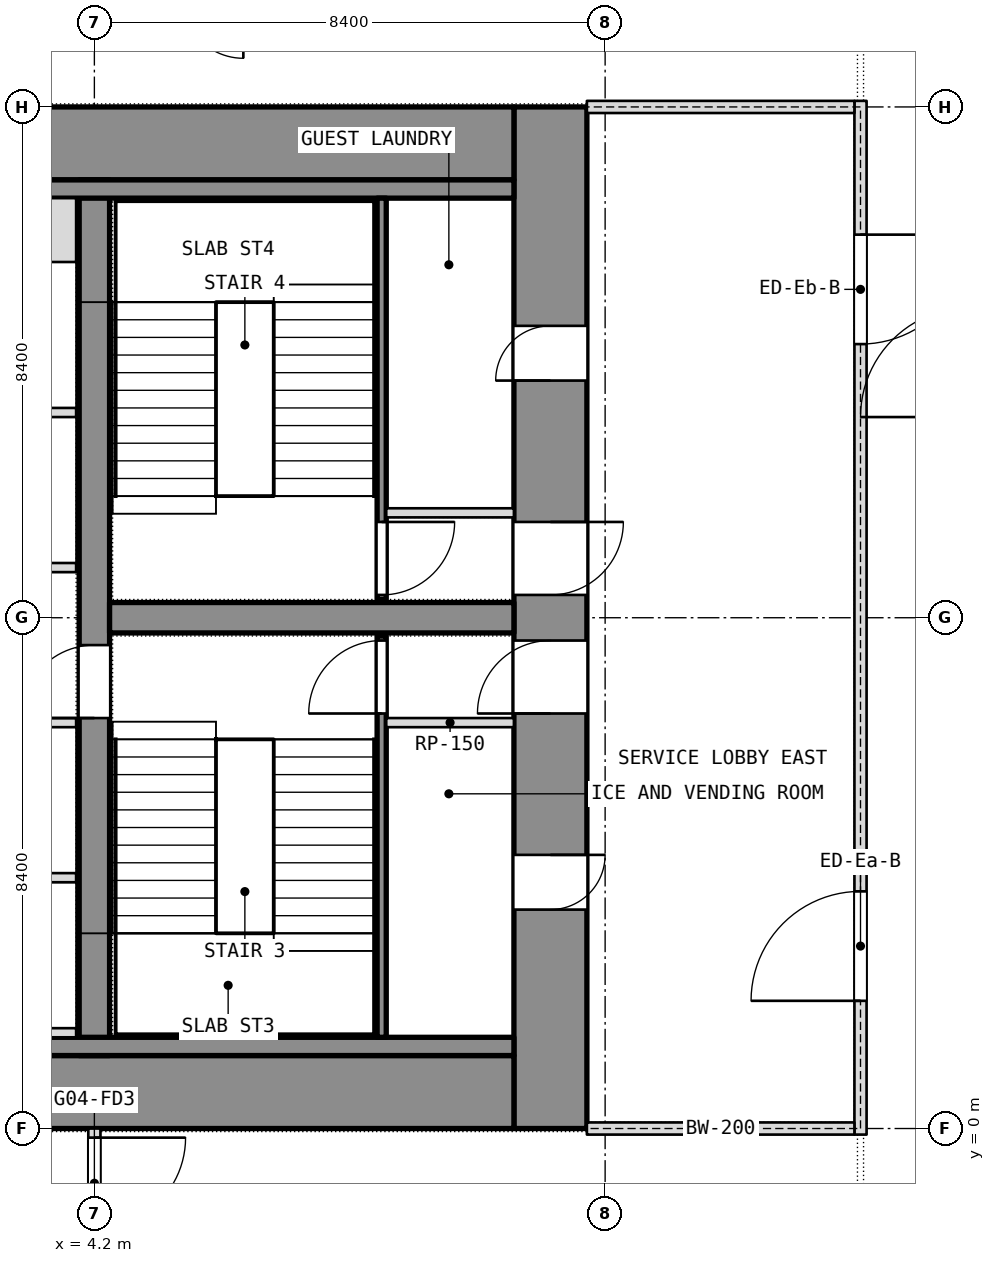
"""IFC4 building model, lengths in metres.
Left out: names, types, materials, properties, quantities, classifications, styles, units other than length and angle.
Written with IfcOpenShell. Run it as: python <this file> out.ifc"""

import sys

from ifc_helpers import new_model, si_unit, direction, frame, frame_2d, origin, place, context, subcontext, project, spatial, rectangle, extrude, element, fill, save


model = new_model("IFC4")
c1 = context("Model", 3, precision=1e-05, world=origin(), true_north=direction((0.0, 1.0)))
c2 = subcontext(c1, "Body", "Model", "MODEL_VIEW")
j1 = project(units=[si_unit("LENGTHUNIT", "METRE"), si_unit("PLANEANGLEUNIT", "RADIAN")], contexts=[c1])
p1 = place(None, origin())
s1 = spatial("IfcSite", under=j1, at=p1, CompositionType="ELEMENT")
p2 = place(p1, origin())
s2 = spatial("IfcBuilding", under=s1, at=p2, CompositionType="ELEMENT")
p3 = place(p2, frame((0.0, 0.0, 54.5)))
s3 = spatial("IfcBuildingStorey", under=s2, at=p3, CompositionType="ELEMENT", Elevation=54.5)
p4 = place(p3, frame((11.7, 0.0, 0.0), z_axis=(0.0, 0.0, 1.0), x_axis=(0.0, 1.0, 0.0)))
e1 = element("IfcWall", 1, at=p4, inside=s3, PredefinedType="SHEAR", context=c2, shape_type="SweptSolid", body=[
    extrude(rectangle(XDim=16.8, YDim=1.2, at=frame_2d((8.4, 0.0))), origin(), (0.0, 0.0, 1.0), 3.6),
])
p5 = place(p4, frame((3.6, 0.0, 0.0)))
e2 = element("IfcOpeningElement", 2, at=p5, cuts=e1, PredefinedType="OPENING", context=c2, shape_type="SweptSolid", body=[
    extrude(rectangle(XDim=0.9, YDim=2.1, at=frame_2d((0.45, 1.05))), frame((0.0, 0.6, 0.0), z_axis=(0.0, -1.0, 0.0), x_axis=(1.0, 0.0, 0.0)), (0.0, 0.0, 1.0), 1.2),
])
p6 = place(p4, frame((6.825, 0.0, 0.0)))
e3 = element("IfcOpeningElement", 3, at=p6, cuts=e1, PredefinedType="OPENING", context=c2, shape_type="SweptSolid", body=[
    extrude(rectangle(XDim=1.2, YDim=2.1, at=frame_2d((0.6, 1.05))), frame((0.0, 0.6, 0.0), z_axis=(0.0, -1.0, 0.0), x_axis=(1.0, 0.0, 0.0)), (0.0, 0.0, 1.0), 1.2),
])
p7 = place(p4, frame((12.3, 0.0, 0.0)))
e4 = element("IfcOpeningElement", 4, at=p7, cuts=e1, PredefinedType="OPENING", context=c2, shape_type="SweptSolid", body=[
    extrude(rectangle(XDim=0.9, YDim=2.1, at=frame_2d((0.45, 1.05))), frame((0.0, 0.6, 0.0), z_axis=(0.0, -1.0, 0.0), x_axis=(1.0, 0.0, 0.0)), (0.0, 0.0, 1.0), 1.2),
])
p8 = place(p4, frame((8.775, 0.0, 0.0)))
e5 = element("IfcOpeningElement", 5, at=p8, cuts=e1, PredefinedType="OPENING", context=c2, shape_type="SweptSolid", body=[
    extrude(rectangle(XDim=1.2, YDim=2.1, at=frame_2d((0.6, 1.05))), frame((0.0, 0.6, 0.0), z_axis=(0.0, -1.0, 0.0), x_axis=(1.0, 0.0, 0.0)), (0.0, 0.0, 1.0), 1.2),
])
for number, where, z_axis, x_axis in (
    (6, (-11.1, 0.6, 0.0), (0.0, 0.0, 1.0), (1.0, 0.0, 0.0)),
    (7, (-11.1, 16.2, 0.0), (0.0, 0.0, 1.0), (1.0, 0.0, 0.0)),
):
    element("IfcWall", number, at=place(p3, frame(where, z_axis=z_axis, x_axis=x_axis)), inside=s3, PredefinedType="SHEAR", context=c2, shape_type="SweptSolid", body=[
        extrude(rectangle(XDim=22.2, YDim=1.2, at=frame_2d((11.1, 0.0))), origin(), (0.0, 0.0, 1.0), 3.6),
    ])
p9 = place(p3, frame((4.2, 1.2, 0.0), z_axis=(0.0, 0.0, 1.0), x_axis=(0.0, 1.0, 0.0)))
e8 = element("IfcWall", 8, at=p9, inside=s3, PredefinedType="SHEAR", context=c2, shape_type="SweptSolid", body=[
    extrude(rectangle(XDim=14.4, YDim=0.5, at=frame_2d((7.2, 0.0))), origin(), (0.0, 0.0, 1.0), 3.6),
])
p10 = place(p9, frame((5.55, 0.0, 0.0)))
e9 = element("IfcOpeningElement", 9, at=p10, cuts=e8, PredefinedType="OPENING", context=c2, shape_type="SweptSolid", body=[
    extrude(rectangle(XDim=1.2, YDim=2.1, at=frame_2d((0.6, 1.05))), frame((0.0, 0.25, 0.0), z_axis=(0.0, -1.0, 0.0), x_axis=(1.0, 0.0, 0.0)), (0.0, 0.0, 1.0), 0.5),
])
p11 = place(p3, frame((4.45, 8.4, 0.0), z_axis=(0.0, 0.0, 1.0), x_axis=(1.0, 0.0, 0.0)))
e10 = element("IfcWall", 10, at=p11, inside=s3, PredefinedType="SHEAR", context=c2, shape_type="SweptSolid", body=[
    extrude(rectangle(XDim=6.65, YDim=0.5, at=frame_2d((3.325, 0.0))), origin(), (0.0, 0.0, 1.0), 3.6),
])
p12 = place(p3, frame((4.2, -12.7, 0.0), z_axis=(0.0, 0.0, 1.0), x_axis=(0.0, 1.0, 0.0)))
e11 = element("IfcWall", 11, at=p12, inside=s3, PredefinedType="PARTITIONING", context=c2, shape_type="SweptSolid", body=[
    extrude(rectangle(XDim=12.7, YDim=0.2, at=frame_2d((6.35, 0.0))), origin(), (0.0, 0.0, 1.0), 3.34),
])
p13 = place(p12, frame((11.05, 0.0, 0.0)))
e12 = element("IfcOpeningElement", 12, at=p13, cuts=e11, PredefinedType="OPENING", context=c2, shape_type="SweptSolid", body=[
    extrude(rectangle(XDim=1.5, YDim=2.1, at=frame_2d((0.75, 1.05))), frame((0.0, 0.1, 0.0), z_axis=(0.0, -1.0, 0.0), x_axis=(1.0, 0.0, 0.0)), (0.0, 0.0, 1.0), 0.2),
])
p14 = place(p12, frame((0.25, 0.0, 0.0)))
e13 = element("IfcOpeningElement", 13, at=p14, cuts=e11, PredefinedType="OPENING", context=c2, shape_type="SweptSolid", body=[
    extrude(rectangle(XDim=1.5, YDim=2.1, at=frame_2d((0.75, 1.05))), frame((0.0, 0.1, 0.0), z_axis=(0.0, -1.0, 0.0), x_axis=(1.0, 0.0, 0.0)), (0.0, 0.0, 1.0), 0.2),
])
for number, where, z_axis, x_axis in (
    (14, (-11.1, 1.35, 0.0), (0.0, 0.0, 1.0), (1.0, 0.0, 0.0)),
    (15, (-11.1, 15.45, 0.0), (0.0, 0.0, 1.0), (1.0, 0.0, 0.0)),
):
    element("IfcWall", number, at=place(p3, frame(where, z_axis=z_axis, x_axis=x_axis)), inside=s3, PredefinedType="PARTITIONING", context=c2, shape_type="SweptSolid", body=[
        extrude(rectangle(XDim=22.2, YDim=0.3, at=frame_2d((11.1, 0.0))), origin(), (0.0, 0.0, 1.0), 3.34),
    ])
p15 = place(p3, frame((8.925, 1.5, 0.0), z_axis=(0.0, 0.0, 1.0), x_axis=(0.0, 1.0, 0.0)))
e16 = element("IfcWall", 16, at=p15, inside=s3, PredefinedType="SHEAR", context=c2, shape_type="SweptSolid", body=[
    extrude(rectangle(XDim=6.6, YDim=0.15, at=frame_2d((3.3, 0.0))), origin(), (0.0, 0.0, 1.0), 3.34),
])
p16 = place(p15, frame((5.325, 0.0, 0.0)))
e17 = element("IfcOpeningElement", 17, at=p16, cuts=e16, PredefinedType="OPENING", context=c2, shape_type="SweptSolid", body=[
    extrude(rectangle(XDim=1.2, YDim=2.1, at=frame_2d((0.6, 1.05))), frame((0.0, 0.075, 0.0), z_axis=(0.0, -1.0, 0.0), x_axis=(1.0, 0.0, 0.0)), (0.0, 0.0, 1.0), 0.15),
])
p17 = place(p3, frame((9.0, 6.675, 0.0), z_axis=(0.0, 0.0, 1.0), x_axis=(1.0, 0.0, 0.0)))
e18 = element("IfcWall", 18, at=p17, inside=s3, PredefinedType="PARTITIONING", context=c2, shape_type="SweptSolid", body=[
    extrude(rectangle(XDim=2.1, YDim=0.15, at=frame_2d((1.05, 0.0))), origin(), (0.0, 0.0, 1.0), 3.34),
])
p18 = place(p3, frame((8.925, 8.7, 0.0), z_axis=(0.0, 0.0, 1.0), x_axis=(0.0, 1.0, 0.0)))
e19 = element("IfcWall", 19, at=p18, inside=s3, PredefinedType="SHEAR", context=c2, shape_type="SweptSolid", body=[
    extrude(rectangle(XDim=6.6, YDim=0.15, at=frame_2d((3.3, 0.0))), origin(), (0.0, 0.0, 1.0), 3.34),
])
p19 = place(p18, frame((0.075, 0.0, 0.0)))
e20 = element("IfcOpeningElement", 20, at=p19, cuts=e19, PredefinedType="OPENING", context=c2, shape_type="SweptSolid", body=[
    extrude(rectangle(XDim=1.2, YDim=2.1, at=frame_2d((0.6, 1.05))), frame((0.0, 0.075, 0.0), z_axis=(0.0, -1.0, 0.0), x_axis=(1.0, 0.0, 0.0)), (0.0, 0.0, 1.0), 0.15),
])
p20 = place(p3, frame((9.0, 10.125, 0.0), z_axis=(0.0, 0.0, 1.0), x_axis=(1.0, 0.0, 0.0)))
e21 = element("IfcWall", 21, at=p20, inside=s3, PredefinedType="PARTITIONING", context=c2, shape_type="SweptSolid", body=[
    extrude(rectangle(XDim=2.1, YDim=0.15, at=frame_2d((1.05, 0.0))), origin(), (0.0, 0.0, 1.0), 3.34),
])
p21 = place(p3, frame((-3.9, 4.125, 0.0), z_axis=(0.0, 0.0, 1.0), x_axis=(1.0, 0.0, 0.0)))
e22 = element("IfcWall", 22, at=p21, inside=s3, PredefinedType="PARTITIONING", context=c2, shape_type="SweptSolid", body=[
    extrude(rectangle(XDim=7.8, YDim=0.15, at=frame_2d((3.9, 0.0))), origin(), (0.0, 0.0, 1.0), 3.34),
])
p22 = place(p21, frame((3.75, 0.0, 0.0)))
e23 = element("IfcOpeningElement", 23, at=p22, cuts=e22, PredefinedType="OPENING", context=c2, shape_type="SweptSolid", body=[
    extrude(rectangle(XDim=1.2, YDim=2.1, at=frame_2d((0.6, 1.05))), frame((0.0, 0.075, 0.0), z_axis=(0.0, -1.0, 0.0), x_axis=(1.0, 0.0, 0.0)), (0.0, 0.0, 1.0), 0.15),
])
p23 = place(p3, frame((-3.9, 11.775, 0.0), z_axis=(0.0, 0.0, 1.0), x_axis=(1.0, 0.0, 0.0)))
e24 = element("IfcWall", 24, at=p23, inside=s3, PredefinedType="PARTITIONING", context=c2, shape_type="SweptSolid", body=[
    extrude(rectangle(XDim=7.8, YDim=0.15, at=frame_2d((3.9, 0.0))), origin(), (0.0, 0.0, 1.0), 3.34),
])
p24 = place(p23, frame((3.3, 0.0, 0.0)))
e25 = element("IfcOpeningElement", 25, at=p24, cuts=e24, PredefinedType="OPENING", context=c2, shape_type="SweptSolid", body=[
    extrude(rectangle(XDim=1.2, YDim=2.1, at=frame_2d((0.6, 1.05))), frame((0.0, 0.075, 0.0), z_axis=(0.0, -1.0, 0.0), x_axis=(1.0, 0.0, 0.0)), (0.0, 0.0, 1.0), 0.15),
])
p25 = place(p3, frame((1.65, 1.575, 0.0), z_axis=(0.0, 0.0, 1.0), x_axis=(1.0, 0.0, 0.0)))
e26 = element("IfcWall", 26, at=p25, inside=s3, PredefinedType="SHEAR", context=c2, shape_type="SweptSolid", body=[
    extrude(rectangle(XDim=2.25, YDim=0.15, at=frame_2d((1.125, 0.0))), origin(), (0.0, 0.0, 1.0), 3.6),
])
p26 = place(p3, frame((1.65, 14.775, 0.0), z_axis=(0.0, 0.0, 1.0), x_axis=(1.0, 0.0, 0.0)))
e27 = element("IfcWall", 27, at=p26, inside=s3, PredefinedType="SHEAR", context=c2, shape_type="SweptSolid", body=[
    extrude(rectangle(XDim=2.25, YDim=1.05, at=frame_2d((1.125, 0.0))), origin(), (0.0, 0.0, 1.0), 3.6),
])
for number, where, z_axis, x_axis in (
    (28, (1.65, 6.675, 0.0), (0.0, 0.0, 1.0), (1.0, 0.0, 0.0)),
    (29, (1.65, 9.225, 0.0), (0.0, 0.0, 1.0), (1.0, 0.0, 0.0)),
):
    element("IfcWall", number, at=place(p3, frame(where, z_axis=z_axis, x_axis=x_axis)), inside=s3, PredefinedType="SHEAR", context=c2, shape_type="SweptSolid", body=[
        extrude(rectangle(XDim=2.25, YDim=0.15, at=frame_2d((1.125, 0.0))), origin(), (0.0, 0.0, 1.0), 3.6),
    ])
p27 = place(p3, frame((16.8, -0.1, 0.0), z_axis=(0.0, 0.0, 1.0), x_axis=(0.0, 1.0, 0.0)))
e30 = element("IfcWall", 30, at=p27, inside=s3, PredefinedType="PARTITIONING", context=c2, shape_type="SweptSolid", body=[
    extrude(rectangle(XDim=17.0, YDim=0.2, at=frame_2d((8.5, 0.0))), origin(), (0.0, 0.0, 1.0), 3.34),
])
p28 = place(p27, frame((2.2, 0.0, 0.0)))
e31 = element("IfcOpeningElement", 31, at=p28, cuts=e30, PredefinedType="OPENING", context=c2, shape_type="SweptSolid", body=[
    extrude(rectangle(XDim=1.8, YDim=2.1, at=frame_2d((0.9, 1.05))), frame((0.0, 0.1, 0.0), z_axis=(0.0, -1.0, 0.0), x_axis=(1.0, 0.0, 0.0)), (0.0, 0.0, 1.0), 0.2),
])
p29 = place(p27, frame((13.0, 0.0, 0.0)))
e32 = element("IfcOpeningElement", 32, at=p29, cuts=e30, PredefinedType="OPENING", context=c2, shape_type="SweptSolid", body=[
    extrude(rectangle(XDim=1.8, YDim=2.1, at=frame_2d((0.9, 1.05))), frame((0.0, 0.1, 0.0), z_axis=(0.0, -1.0, 0.0), x_axis=(1.0, 0.0, 0.0)), (0.0, 0.0, 1.0), 0.2),
])
for number, where, z_axis, x_axis in (
    (33, (12.3, 0.0, 0.0), (0.0, 0.0, 1.0), (1.0, 0.0, 0.0)),
    (34, (12.3, 16.8, 0.0), (0.0, 0.0, 1.0), (1.0, 0.0, 0.0)),
):
    element("IfcWall", number, at=place(p3, frame(where, z_axis=z_axis, x_axis=x_axis)), inside=s3, PredefinedType="PARTITIONING", context=c2, shape_type="SweptSolid", body=[
        extrude(rectangle(XDim=4.4, YDim=0.2, at=frame_2d((2.2, 0.0))), origin(), (0.0, 0.0, 1.0), 2.84),
    ])
p30 = place(p5, origin())
e35 = element("IfcDoor", 35, at=p30, inside=s3, OperationType="SINGLE_SWING_LEFT", PredefinedType="DOOR", context=c2, shape_type="SweptSolid", body=[
    extrude(rectangle(XDim=0.9, YDim=2.1, at=frame_2d((0.45, 1.05))), frame((0.0, 0.025, 0.0), z_axis=(0.0, -1.0, 0.0), x_axis=(1.0, 0.0, 0.0)), (0.0, 0.0, 1.0), 0.05),
])
fill(e2, e35)
p31 = place(p6, origin())
e36 = element("IfcDoor", 36, at=p31, inside=s3, OperationType="SINGLE_SWING_LEFT", PredefinedType="DOOR", context=c2, shape_type="SweptSolid", body=[
    extrude(rectangle(XDim=1.2, YDim=2.1, at=frame_2d((0.6, 1.05))), frame((0.0, 0.025, 0.0), z_axis=(0.0, -1.0, 0.0), x_axis=(1.0, 0.0, 0.0)), (0.0, 0.0, 1.0), 0.05),
])
fill(e3, e36)
p32 = place(p16, origin())
e37 = element("IfcDoor", 37, at=p32, inside=s3, OperationType="SINGLE_SWING_LEFT", PredefinedType="DOOR", context=c2, shape_type="SweptSolid", body=[
    extrude(rectangle(XDim=1.2, YDim=2.1, at=frame_2d((0.6, 1.05))), frame((0.0, 0.025, 0.0), z_axis=(0.0, -1.0, 0.0), x_axis=(1.0, 0.0, 0.0)), (0.0, 0.0, 1.0), 0.05),
])
fill(e17, e37)
p33 = place(p7, origin())
e38 = element("IfcDoor", 38, at=p33, inside=s3, OperationType="SINGLE_SWING_LEFT", PredefinedType="DOOR", context=c2, shape_type="SweptSolid", body=[
    extrude(rectangle(XDim=0.9, YDim=2.1, at=frame_2d((0.45, 1.05))), frame((0.0, 0.025, 0.0), z_axis=(0.0, -1.0, 0.0), x_axis=(1.0, 0.0, 0.0)), (0.0, 0.0, 1.0), 0.05),
])
fill(e4, e38)
p34 = place(p8, origin())
e39 = element("IfcDoor", 39, at=p34, inside=s3, OperationType="SINGLE_SWING_LEFT", PredefinedType="DOOR", context=c2, shape_type="SweptSolid", body=[
    extrude(rectangle(XDim=1.2, YDim=2.1, at=frame_2d((0.6, 1.05))), frame((0.0, 0.025, 0.0), z_axis=(0.0, -1.0, 0.0), x_axis=(1.0, 0.0, 0.0)), (0.0, 0.0, 1.0), 0.05),
])
fill(e5, e39)
p35 = place(p19, origin())
e40 = element("IfcDoor", 40, at=p35, inside=s3, OperationType="SINGLE_SWING_LEFT", PredefinedType="DOOR", context=c2, shape_type="SweptSolid", body=[
    extrude(rectangle(XDim=1.2, YDim=2.1, at=frame_2d((0.6, 1.05))), frame((0.0, 0.025, 0.0), z_axis=(0.0, -1.0, 0.0), x_axis=(1.0, 0.0, 0.0)), (0.0, 0.0, 1.0), 0.05),
])
fill(e20, e40)
p36 = place(p10, origin())
e41 = element("IfcDoor", 41, at=p36, inside=s3, OperationType="SINGLE_SWING_LEFT", PredefinedType="DOOR", context=c2, shape_type="SweptSolid", body=[
    extrude(rectangle(XDim=1.2, YDim=2.1, at=frame_2d((0.6, 1.05))), frame((0.0, 0.025, 0.0), z_axis=(0.0, -1.0, 0.0), x_axis=(1.0, 0.0, 0.0)), (0.0, 0.0, 1.0), 0.05),
])
fill(e9, e41)
p37 = place(p28, origin())
e42 = element("IfcDoor", 42, at=p37, inside=s3, OperationType="DOUBLE_DOOR_SINGLE_SWING", PredefinedType="DOOR", context=c2, shape_type="SweptSolid", body=[
    extrude(rectangle(XDim=1.8, YDim=2.1, at=frame_2d((0.9, 1.05))), frame((0.0, 0.025, 0.0), z_axis=(0.0, -1.0, 0.0), x_axis=(1.0, 0.0, 0.0)), (0.0, 0.0, 1.0), 0.05),
])
fill(e31, e42)
p38 = place(p29, origin())
e43 = element("IfcDoor", 43, at=p38, inside=s3, OperationType="DOUBLE_DOOR_SINGLE_SWING", PredefinedType="DOOR", context=c2, shape_type="SweptSolid", body=[
    extrude(rectangle(XDim=1.8, YDim=2.1, at=frame_2d((0.9, 1.05))), frame((0.0, 0.025, 0.0), z_axis=(0.0, -1.0, 0.0), x_axis=(1.0, 0.0, 0.0)), (0.0, 0.0, 1.0), 0.05),
])
fill(e32, e43)
p39 = place(p13, origin())
e44 = element("IfcDoor", 44, at=p39, inside=s3, OperationType="DOUBLE_DOOR_DOUBLE_SWING", PredefinedType="DOOR", context=c2, shape_type="SweptSolid", body=[
    extrude(rectangle(XDim=1.5, YDim=2.1, at=frame_2d((0.75, 1.05))), frame((0.0, 0.025, 0.0), z_axis=(0.0, -1.0, 0.0), x_axis=(1.0, 0.0, 0.0)), (0.0, 0.0, 1.0), 0.05),
])
fill(e12, e44)
save(model, sys.argv[1])
